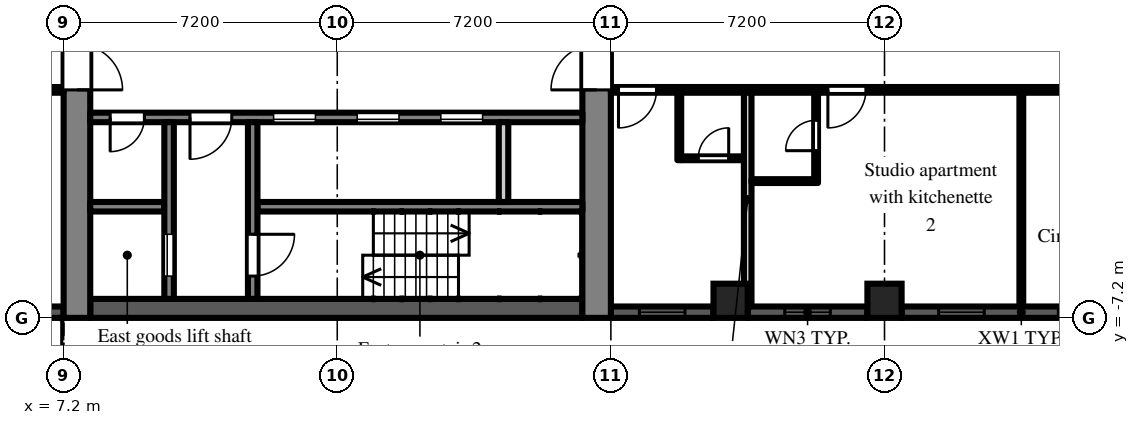
"""IFC4 building model, lengths in metres.
Left out: names, types, materials, properties, quantities, classifications, styles, units other than length and angle.
Written with IfcOpenShell. Run it as: python <this file> out.ifc"""

import sys

from ifc_helpers import new_model, si_unit, direction, frame, frame_2d, origin, origin_2d, place, context, subcontext, project, spatial, rectangle, extrude, element, fill, save


model = new_model("IFC4")
c1 = context("Model", 3, precision=1e-05, world=origin(), true_north=direction((0.0, 1.0)))
c2 = subcontext(c1, "Body", "Model", "MODEL_VIEW")
j1 = project(units=[si_unit("LENGTHUNIT", "METRE"), si_unit("PLANEANGLEUNIT", "RADIAN")], contexts=[c1])
p1 = place(None, origin())
s1 = spatial("IfcSite", under=j1, at=p1, CompositionType="ELEMENT")
p2 = place(p1, origin())
s2 = spatial("IfcBuilding", under=s1, at=p2, CompositionType="ELEMENT")
p3 = place(p2, frame((0.0, 0.0, 102.9)))
s3 = spatial("IfcBuildingStorey", under=s2, at=p3, CompositionType="ELEMENT", Elevation=102.9)
for number, where, z_axis, x_axis in (
    (1, (24.75, -6.75, 0.0), (0.0, 0.0, 1.0), (1.0, 0.0, 0.0)),
    (2, (28.8, -6.75, 0.0), (0.0, 0.0, 1.0), (1.0, 0.0, 0.0)),
):
    element("IfcColumn", number, at=place(p3, frame(where, z_axis=z_axis, x_axis=x_axis)), inside=s3, PredefinedType="COLUMN", context=c2, shape_type="SweptSolid", body=[
        extrude(rectangle(XDim=0.9, YDim=0.9, at=origin_2d()), origin(), (0.0, 0.0, 1.0), 3.0),
    ])
p4 = place(p3, frame((21.6, -7.05, 0.0), z_axis=(0.0, 0.0, 1.0), x_axis=(1.0, 0.0, 0.0)))
e3 = element("IfcWall", 3, at=p4, inside=s3, PredefinedType="SOLIDWALL", context=c2, shape_type="SweptSolid", body=[
    extrude(rectangle(XDim=2.7, YDim=0.3, at=frame_2d((1.35, 0.0))), origin(), (0.0, 0.0, 1.0), 2.1),
])
p5 = place(p4, frame((0.75, 0.0, 0.2)))
e4 = element("IfcOpeningElement", 4, at=p5, cuts=e3, PredefinedType="OPENING", context=c2, shape_type="SweptSolid", body=[
    extrude(rectangle(XDim=1.2, YDim=1.85, at=frame_2d((0.6, 0.925))), frame((0.0, 0.16, 0.0), z_axis=(0.0, -1.0, 0.0), x_axis=(1.0, 0.0, 0.0)), (0.0, 0.0, 1.0), 0.32),
])
p6 = place(p3, frame((25.2, -7.05, 0.0), z_axis=(0.0, 0.0, 1.0), x_axis=(1.0, 0.0, 0.0)))
e5 = element("IfcWall", 5, at=p6, inside=s3, PredefinedType="SOLIDWALL", context=c2, shape_type="SweptSolid", body=[
    extrude(rectangle(XDim=3.15, YDim=0.3, at=frame_2d((1.575, 0.0))), origin(), (0.0, 0.0, 1.0), 2.1),
])
p7 = place(p6, frame((0.975, 0.0, 0.2)))
e6 = element("IfcOpeningElement", 6, at=p7, cuts=e5, PredefinedType="OPENING", context=c2, shape_type="SweptSolid", body=[
    extrude(rectangle(XDim=1.2, YDim=1.85, at=frame_2d((0.6, 0.925))), frame((0.0, 0.16, 0.0), z_axis=(0.0, -1.0, 0.0), x_axis=(1.0, 0.0, 0.0)), (0.0, 0.0, 1.0), 0.32),
])
p8 = place(p3, frame((29.25, -7.05, 0.0), z_axis=(0.0, 0.0, 1.0), x_axis=(1.0, 0.0, 0.0)))
e7 = element("IfcWall", 7, at=p8, inside=s3, PredefinedType="SOLIDWALL", context=c2, shape_type="SweptSolid", body=[
    extrude(rectangle(XDim=6.3, YDim=0.3, at=frame_2d((3.15, 0.0))), origin(), (0.0, 0.0, 1.0), 2.1),
])
p9 = place(p8, frame((0.975, 0.0, 0.2)))
e8 = element("IfcOpeningElement", 8, at=p9, cuts=e7, PredefinedType="OPENING", context=c2, shape_type="SweptSolid", body=[
    extrude(rectangle(XDim=1.2, YDim=1.85, at=frame_2d((0.6, 0.925))), frame((0.0, 0.16, 0.0), z_axis=(0.0, -1.0, 0.0), x_axis=(1.0, 0.0, 0.0)), (0.0, 0.0, 1.0), 0.32),
])
p10 = place(p8, frame((4.125, 0.0, 0.2)))
e9 = element("IfcOpeningElement", 9, at=p10, cuts=e7, PredefinedType="OPENING", context=c2, shape_type="SweptSolid", body=[
    extrude(rectangle(XDim=1.2, YDim=1.85, at=frame_2d((0.6, 0.925))), frame((0.0, 0.16, 0.0), z_axis=(0.0, -1.0, 0.0), x_axis=(1.0, 0.0, 0.0)), (0.0, 0.0, 1.0), 0.32),
])
p11 = place(p3, frame((4.2, -7.05, 0.0), z_axis=(0.0, 0.0, 1.0), x_axis=(1.0, 0.0, 0.0)))
e10 = element("IfcWall", 10, at=p11, inside=s3, PredefinedType="SOLIDWALL", context=c2, shape_type="SweptSolid", body=[
    extrude(rectangle(XDim=3.0, YDim=0.3, at=frame_2d((1.5, 0.0))), origin(), (0.0, 0.0, 1.0), 2.1),
])
p12 = place(p3, frame((7.55, -7.2, 0.0), z_axis=(0.0, 0.0, 1.0), x_axis=(0.0, 1.0, 0.0)))
e11 = element("IfcWall", 11, at=p12, inside=s3, PredefinedType="SHEAR", context=c2, shape_type="SweptSolid", body=[
    extrude(rectangle(XDim=14.4, YDim=0.7, at=frame_2d((7.2, 0.0))), origin(), (0.0, 0.0, 1.0), 2.575),
])
p13 = place(p12, frame((6.0, 0.0, 0.0)))
e12 = element("IfcOpeningElement", 12, at=p13, cuts=e11, PredefinedType="OPENING", context=c2, shape_type="SweptSolid", body=[
    extrude(rectangle(XDim=2.4, YDim=2.2, at=frame_2d((1.2, 1.1))), frame((0.0, 0.36, 0.0), z_axis=(0.0, -1.0, 0.0), x_axis=(1.0, 0.0, 0.0)), (0.0, 0.0, 1.0), 0.72),
])
p14 = place(p3, frame((21.225, -7.2, 0.0), z_axis=(0.0, 0.0, 1.0), x_axis=(0.0, 1.0, 0.0)))
e13 = element("IfcWall", 13, at=p14, inside=s3, PredefinedType="SHEAR", context=c2, shape_type="SweptSolid", body=[
    extrude(rectangle(XDim=14.4, YDim=0.75, at=frame_2d((7.2, 0.0))), origin(), (0.0, 0.0, 1.0), 2.575),
])
p15 = place(p14, frame((6.0, 0.0, 0.0)))
e14 = element("IfcOpeningElement", 14, at=p15, cuts=e13, PredefinedType="OPENING", context=c2, shape_type="SweptSolid", body=[
    extrude(rectangle(XDim=2.4, YDim=2.2, at=frame_2d((1.2, 1.1))), frame((0.0, 0.385, 0.0), z_axis=(0.0, -1.0, 0.0), x_axis=(1.0, 0.0, 0.0)), (0.0, 0.0, 1.0), 0.77),
])
p16 = place(p3, frame((7.9, -6.95, 0.0), z_axis=(0.0, 0.0, 1.0), x_axis=(1.0, 0.0, 0.0)))
e15 = element("IfcWall", 15, at=p16, inside=s3, PredefinedType="SHEAR", context=c2, shape_type="SweptSolid", body=[
    extrude(rectangle(XDim=12.95, YDim=0.5, at=frame_2d((6.475, 0.0))), origin(), (0.0, 0.0, 1.0), 2.575),
])
p17 = place(p3, frame((7.9, -1.925, 0.0), z_axis=(0.0, 0.0, 1.0), x_axis=(1.0, 0.0, 0.0)))
e16 = element("IfcWall", 16, at=p17, inside=s3, PredefinedType="SHEAR", context=c2, shape_type="SweptSolid", body=[
    extrude(rectangle(XDim=12.95, YDim=0.25, at=frame_2d((6.475, 0.0))), origin(), (0.0, 0.0, 1.0), 2.575),
])
p18 = place(p17, frame((4.825, 0.0, 0.0)))
e17 = element("IfcOpeningElement", 17, at=p18, cuts=e16, PredefinedType="OPENING", context=c2, shape_type="SweptSolid", body=[
    extrude(rectangle(XDim=1.1, YDim=2.1, at=frame_2d((0.55, 1.05))), frame((0.0, 0.135, 0.0), z_axis=(0.0, -1.0, 0.0), x_axis=(1.0, 0.0, 0.0)), (0.0, 0.0, 1.0), 0.27),
])
p19 = place(p17, frame((7.025, 0.0, 0.0)))
e18 = element("IfcOpeningElement", 18, at=p19, cuts=e16, PredefinedType="OPENING", context=c2, shape_type="SweptSolid", body=[
    extrude(rectangle(XDim=1.1, YDim=2.1, at=frame_2d((0.55, 1.05))), frame((0.0, 0.135, 0.0), z_axis=(0.0, -1.0, 0.0), x_axis=(1.0, 0.0, 0.0)), (0.0, 0.0, 1.0), 0.27),
])
p20 = place(p17, frame((9.225, 0.0, 0.0)))
e19 = element("IfcOpeningElement", 19, at=p20, cuts=e16, PredefinedType="OPENING", context=c2, shape_type="SweptSolid", body=[
    extrude(rectangle(XDim=1.1, YDim=2.1, at=frame_2d((0.55, 1.05))), frame((0.0, 0.135, 0.0), z_axis=(0.0, -1.0, 0.0), x_axis=(1.0, 0.0, 0.0)), (0.0, 0.0, 1.0), 0.27),
])
p21 = place(p17, frame((0.525, 0.0, 0.0)))
e20 = element("IfcOpeningElement", 20, at=p21, cuts=e16, PredefinedType="OPENING", context=c2, shape_type="SweptSolid", body=[
    extrude(rectangle(XDim=0.9, YDim=2.1, at=frame_2d((0.45, 1.05))), frame((0.0, 0.135, 0.0), z_axis=(0.0, -1.0, 0.0), x_axis=(1.0, 0.0, 0.0)), (0.0, 0.0, 1.0), 0.27),
])
p22 = place(p17, frame((2.625, 0.0, 0.0)))
e21 = element("IfcOpeningElement", 21, at=p22, cuts=e16, PredefinedType="OPENING", context=c2, shape_type="SweptSolid", body=[
    extrude(rectangle(XDim=1.1, YDim=2.1, at=frame_2d((0.55, 1.05))), frame((0.0, 0.135, 0.0), z_axis=(0.0, -1.0, 0.0), x_axis=(1.0, 0.0, 0.0)), (0.0, 0.0, 1.0), 0.27),
])
p23 = place(p3, frame((7.9, -4.275, 0.0), z_axis=(0.0, 0.0, 1.0), x_axis=(1.0, 0.0, 0.0)))
e22 = element("IfcWall", 22, at=p23, inside=s3, PredefinedType="SHEAR", context=c2, shape_type="SweptSolid", body=[
    extrude(rectangle(XDim=1.95, YDim=0.25, at=frame_2d((0.975, 0.0))), origin(), (0.0, 0.0, 1.0), 2.575),
])
p24 = place(p3, frame((12.3, -4.275, 0.0), z_axis=(0.0, 0.0, 1.0), x_axis=(1.0, 0.0, 0.0)))
e23 = element("IfcWall", 23, at=p24, inside=s3, PredefinedType="SHEAR", context=c2, shape_type="SweptSolid", body=[
    extrude(rectangle(XDim=8.55, YDim=0.25, at=frame_2d((4.275, 0.0))), origin(), (0.0, 0.0, 1.0), 2.575),
])
p25 = place(p3, frame((9.975, -2.05, 0.0), z_axis=(0.0, 0.0, 1.0), x_axis=(0.0, -1.0, 0.0)))
e24 = element("IfcWall", 24, at=p25, inside=s3, PredefinedType="SHEAR", context=c2, shape_type="SweptSolid", body=[
    extrude(rectangle(XDim=4.65, YDim=0.25, at=frame_2d((2.325, 0.0))), origin(), (0.0, 0.0, 1.0), 2.575),
])
p26 = place(p25, frame((2.95, 0.0, 0.0)))
e25 = element("IfcOpeningElement", 25, at=p26, cuts=e24, PredefinedType="OPENING", context=c2, shape_type="SweptSolid", body=[
    extrude(rectangle(XDim=1.1, YDim=2.1, at=frame_2d((0.55, 1.05))), frame((0.0, 0.135, 0.0), z_axis=(0.0, -1.0, 0.0), x_axis=(1.0, 0.0, 0.0)), (0.0, 0.0, 1.0), 0.27),
])
p27 = place(p3, frame((12.175, -2.05, 0.0), z_axis=(0.0, 0.0, 1.0), x_axis=(0.0, -1.0, 0.0)))
e26 = element("IfcWall", 26, at=p27, inside=s3, PredefinedType="SHEAR", context=c2, shape_type="SweptSolid", body=[
    extrude(rectangle(XDim=4.65, YDim=0.25, at=frame_2d((2.325, 0.0))), origin(), (0.0, 0.0, 1.0), 2.575),
])
p28 = place(p27, frame((2.95, 0.0, 0.0)))
e27 = element("IfcOpeningElement", 27, at=p28, cuts=e26, PredefinedType="OPENING", context=c2, shape_type="SweptSolid", body=[
    extrude(rectangle(XDim=1.1, YDim=2.1, at=frame_2d((0.55, 1.05))), frame((0.0, 0.135, 0.0), z_axis=(0.0, -1.0, 0.0), x_axis=(1.0, 0.0, 0.0)), (0.0, 0.0, 1.0), 0.27),
])
p29 = place(p3, frame((18.775, -2.05, 0.0), z_axis=(0.0, 0.0, 1.0), x_axis=(0.0, -1.0, 0.0)))
e28 = element("IfcWall", 28, at=p29, inside=s3, PredefinedType="PARTITIONING", context=c2, shape_type="SweptSolid", body=[
    extrude(rectangle(XDim=2.1, YDim=0.25, at=frame_2d((1.05, 0.0))), origin(), (0.0, 0.0, 1.0), 2.575),
])
p30 = place(p3, frame((1.275, -1.2, 0.0), z_axis=(0.0, 0.0, 1.0), x_axis=(1.0, 0.0, 0.0)))
e29 = element("IfcWall", 29, at=p30, inside=s3, PredefinedType="PARTITIONING", context=c2, shape_type="SweptSolid", body=[
    extrude(rectangle(XDim=5.925, YDim=0.15, at=frame_2d((2.962, 0.0))), origin(), (0.0, 0.0, 1.0), 2.575),
])
p31 = place(p30, frame((3.075, 0.0, 0.0)))
e30 = element("IfcOpeningElement", 30, at=p31, cuts=e29, PredefinedType="OPENING", context=c2, shape_type="SweptSolid", body=[
    extrude(rectangle(XDim=0.9, YDim=2.1, at=frame_2d((0.45, 1.05))), frame((0.0, 0.085, 0.0), z_axis=(0.0, -1.0, 0.0), x_axis=(1.0, 0.0, 0.0)), (0.0, 0.0, 1.0), 0.17),
])
p32 = place(p3, frame((21.6, -1.2, 0.0), z_axis=(0.0, 0.0, 1.0), x_axis=(1.0, 0.0, 0.0)))
e31 = element("IfcWall", 31, at=p32, inside=s3, PredefinedType="PARTITIONING", context=c2, shape_type="SweptSolid", body=[
    extrude(rectangle(XDim=14.9, YDim=0.15, at=frame_2d((7.45, 0.0))), origin(), (0.0, 0.0, 1.0), 2.575),
])
p33 = place(p32, frame((0.2, 0.0, 0.0)))
e32 = element("IfcOpeningElement", 32, at=p33, cuts=e31, PredefinedType="OPENING", context=c2, shape_type="SweptSolid", body=[
    extrude(rectangle(XDim=1.0, YDim=2.1, at=frame_2d((0.5, 1.05))), frame((0.0, 0.085, 0.0), z_axis=(0.0, -1.0, 0.0), x_axis=(1.0, 0.0, 0.0)), (0.0, 0.0, 1.0), 0.17),
])
p34 = place(p32, frame((5.71, 0.0, 0.0)))
e33 = element("IfcOpeningElement", 33, at=p34, cuts=e31, PredefinedType="OPENING", context=c2, shape_type="SweptSolid", body=[
    extrude(rectangle(XDim=1.0, YDim=2.1, at=frame_2d((0.5, 1.05))), frame((0.0, 0.085, 0.0), z_axis=(0.0, -1.0, 0.0), x_axis=(1.0, 0.0, 0.0)), (0.0, 0.0, 1.0), 0.17),
])
p35 = place(p32, frame((11.95, 0.0, 0.0)))
e34 = element("IfcOpeningElement", 34, at=p35, cuts=e31, PredefinedType="OPENING", context=c2, shape_type="SweptSolid", body=[
    extrude(rectangle(XDim=1.8, YDim=2.1, at=frame_2d((0.9, 1.05))), frame((0.0, 0.085, 0.0), z_axis=(0.0, -1.0, 0.0), x_axis=(1.0, 0.0, 0.0)), (0.0, 0.0, 1.0), 0.17),
])
p36 = place(p3, frame((23.4, -3.05, 0.0), z_axis=(0.0, 0.0, 1.0), x_axis=(0.0, 1.0, 0.0)))
e35 = element("IfcWall", 35, at=p36, inside=s3, PredefinedType="PARTITIONING", context=c2, shape_type="SweptSolid", body=[
    extrude(rectangle(XDim=1.775, YDim=0.1, at=frame_2d((0.888, 0.0))), origin(), (0.0, 0.0, 1.0), 2.575),
])
p37 = place(p3, frame((23.45, -3.0, 0.0), z_axis=(0.0, 0.0, 1.0), x_axis=(1.0, 0.0, 0.0)))
e36 = element("IfcWall", 36, at=p37, inside=s3, PredefinedType="PARTITIONING", context=c2, shape_type="SweptSolid", body=[
    extrude(rectangle(XDim=1.65, YDim=0.1, at=frame_2d((0.825, 0.0))), origin(), (0.0, 0.0, 1.0), 2.575),
])
p38 = place(p37, frame((0.45, 0.0, 0.0)))
e37 = element("IfcOpeningElement", 37, at=p38, cuts=e36, PredefinedType="OPENING", context=c2, shape_type="SweptSolid", body=[
    extrude(rectangle(XDim=0.8, YDim=2.1, at=frame_2d((0.4, 1.05))), frame((0.0, 0.06, 0.0), z_axis=(0.0, -1.0, 0.0), x_axis=(1.0, 0.0, 0.0)), (0.0, 0.0, 1.0), 0.12),
])
p39 = place(p3, frame((25.2, -6.9, 0.0), z_axis=(0.0, 0.0, 1.0), x_axis=(0.0, 1.0, 0.0)))
e38 = element("IfcWall", 38, at=p39, inside=s3, PredefinedType="PARTITIONING", context=c2, shape_type="SweptSolid", body=[
    extrude(rectangle(XDim=5.625, YDim=0.2, at=frame_2d((2.812, 0.0))), origin(), (0.0, 0.0, 1.0), 2.575),
])
p40 = place(p3, frame((25.3, -3.6, 0.0), z_axis=(0.0, 0.0, 1.0), x_axis=(1.0, 0.0, 0.0)))
e39 = element("IfcWall", 39, at=p40, inside=s3, PredefinedType="PARTITIONING", context=c2, shape_type="SweptSolid", body=[
    extrude(rectangle(XDim=1.75, YDim=0.1, at=frame_2d((0.875, 0.0))), origin(), (0.0, 0.0, 1.0), 2.575),
])
p41 = place(p3, frame((27.0, -3.55, 0.0), z_axis=(0.0, 0.0, 1.0), x_axis=(0.0, 1.0, 0.0)))
e40 = element("IfcWall", 40, at=p41, inside=s3, PredefinedType="PARTITIONING", context=c2, shape_type="SweptSolid", body=[
    extrude(rectangle(XDim=2.275, YDim=0.1, at=frame_2d((1.138, 0.0))), origin(), (0.0, 0.0, 1.0), 2.575),
])
p42 = place(p41, frame((0.75, 0.0, 0.0)))
e41 = element("IfcOpeningElement", 41, at=p42, cuts=e40, PredefinedType="OPENING", context=c2, shape_type="SweptSolid", body=[
    extrude(rectangle(XDim=0.8, YDim=2.1, at=frame_2d((0.4, 1.05))), frame((0.0, 0.06, 0.0), z_axis=(0.0, -1.0, 0.0), x_axis=(1.0, 0.0, 0.0)), (0.0, 0.0, 1.0), 0.12),
])
p43 = place(p3, frame((32.4, -6.9, 0.0), z_axis=(0.0, 0.0, 1.0), x_axis=(0.0, 1.0, 0.0)))
e42 = element("IfcWall", 42, at=p43, inside=s3, PredefinedType="PARTITIONING", context=c2, shape_type="SweptSolid", body=[
    extrude(rectangle(XDim=5.625, YDim=0.1, at=frame_2d((2.812, 0.0))), origin(), (0.0, 0.0, 1.0), 2.575),
])
p44 = place(p5, origin())
e43 = element("IfcWindow", 43, at=p44, inside=s3, PartitioningType="SINGLE_PANEL", PredefinedType="WINDOW", context=c2, shape_type="SweptSolid", body=[
    extrude(rectangle(XDim=1.2, YDim=1.85, at=frame_2d((0.6, 0.925))), frame((0.0, 0.03, 0.0), z_axis=(0.0, -1.0, 0.0), x_axis=(1.0, 0.0, 0.0)), (0.0, 0.0, 1.0), 0.06),
])
fill(e4, e43)
p45 = place(p7, origin())
e44 = element("IfcWindow", 44, at=p45, inside=s3, PartitioningType="SINGLE_PANEL", PredefinedType="WINDOW", context=c2, shape_type="SweptSolid", body=[
    extrude(rectangle(XDim=1.2, YDim=1.85, at=frame_2d((0.6, 0.925))), frame((0.0, 0.03, 0.0), z_axis=(0.0, -1.0, 0.0), x_axis=(1.0, 0.0, 0.0)), (0.0, 0.0, 1.0), 0.06),
])
fill(e6, e44)
p46 = place(p9, origin())
e45 = element("IfcWindow", 45, at=p46, inside=s3, PartitioningType="SINGLE_PANEL", PredefinedType="WINDOW", context=c2, shape_type="SweptSolid", body=[
    extrude(rectangle(XDim=1.2, YDim=1.85, at=frame_2d((0.6, 0.925))), frame((0.0, 0.03, 0.0), z_axis=(0.0, -1.0, 0.0), x_axis=(1.0, 0.0, 0.0)), (0.0, 0.0, 1.0), 0.06),
])
fill(e8, e45)
p47 = place(p10, origin())
e46 = element("IfcWindow", 46, at=p47, inside=s3, PartitioningType="SINGLE_PANEL", PredefinedType="WINDOW", context=c2, shape_type="SweptSolid", body=[
    extrude(rectangle(XDim=1.2, YDim=1.85, at=frame_2d((0.6, 0.925))), frame((0.0, 0.03, 0.0), z_axis=(0.0, -1.0, 0.0), x_axis=(1.0, 0.0, 0.0)), (0.0, 0.0, 1.0), 0.06),
])
fill(e9, e46)
p48 = place(p18, origin())
e47 = element("IfcDoor", 47, at=p48, inside=s3, OperationType="SLIDING_TO_LEFT", PredefinedType="DOOR", context=c2, shape_type="SweptSolid", body=[
    extrude(rectangle(XDim=1.1, YDim=2.1, at=frame_2d((0.55, 1.05))), frame((0.0, 0.025, 0.0), z_axis=(0.0, -1.0, 0.0), x_axis=(1.0, 0.0, 0.0)), (0.0, 0.0, 1.0), 0.05),
])
fill(e17, e47)
p49 = place(p19, origin())
e48 = element("IfcDoor", 48, at=p49, inside=s3, OperationType="SLIDING_TO_LEFT", PredefinedType="DOOR", context=c2, shape_type="SweptSolid", body=[
    extrude(rectangle(XDim=1.1, YDim=2.1, at=frame_2d((0.55, 1.05))), frame((0.0, 0.025, 0.0), z_axis=(0.0, -1.0, 0.0), x_axis=(1.0, 0.0, 0.0)), (0.0, 0.0, 1.0), 0.05),
])
fill(e18, e48)
p50 = place(p20, origin())
e49 = element("IfcDoor", 49, at=p50, inside=s3, OperationType="SLIDING_TO_LEFT", PredefinedType="DOOR", context=c2, shape_type="SweptSolid", body=[
    extrude(rectangle(XDim=1.1, YDim=2.1, at=frame_2d((0.55, 1.05))), frame((0.0, 0.025, 0.0), z_axis=(0.0, -1.0, 0.0), x_axis=(1.0, 0.0, 0.0)), (0.0, 0.0, 1.0), 0.05),
])
fill(e19, e49)
p51 = place(p26, origin())
e50 = element("IfcDoor", 50, at=p51, inside=s3, OperationType="SLIDING_TO_LEFT", PredefinedType="DOOR", context=c2, shape_type="SweptSolid", body=[
    extrude(rectangle(XDim=1.1, YDim=2.1, at=frame_2d((0.55, 1.05))), frame((0.0, 0.025, 0.0), z_axis=(0.0, -1.0, 0.0), x_axis=(1.0, 0.0, 0.0)), (0.0, 0.0, 1.0), 0.05),
])
fill(e25, e50)
p52 = place(p28, origin())
e51 = element("IfcDoor", 51, at=p52, inside=s3, OperationType="SINGLE_SWING_LEFT", PredefinedType="DOOR", context=c2, shape_type="SweptSolid", body=[
    extrude(rectangle(XDim=1.1, YDim=2.1, at=frame_2d((0.55, 1.05))), frame((0.0, 0.025, 0.0), z_axis=(0.0, -1.0, 0.0), x_axis=(1.0, 0.0, 0.0)), (0.0, 0.0, 1.0), 0.05),
])
fill(e27, e51)
p53 = place(p21, frame((0.9, 0.0, 0.0), z_axis=(0.0, 0.0, 1.0), x_axis=(-1.0, 0.0, 0.0)))
e52 = element("IfcDoor", 52, at=p53, inside=s3, OperationType="SINGLE_SWING_RIGHT", PredefinedType="DOOR", context=c2, shape_type="SweptSolid", body=[
    extrude(rectangle(XDim=0.9, YDim=2.1, at=frame_2d((0.45, 1.05))), frame((0.0, 0.025, 0.0), z_axis=(0.0, -1.0, 0.0), x_axis=(1.0, 0.0, 0.0)), (0.0, 0.0, 1.0), 0.05),
])
fill(e20, e52)
p54 = place(p22, frame((1.1, 0.0, 0.0), z_axis=(0.0, 0.0, 1.0), x_axis=(-1.0, 0.0, 0.0)))
e53 = element("IfcDoor", 53, at=p54, inside=s3, OperationType="SINGLE_SWING_RIGHT", PredefinedType="DOOR", context=c2, shape_type="SweptSolid", body=[
    extrude(rectangle(XDim=1.1, YDim=2.1, at=frame_2d((0.55, 1.05))), frame((0.0, 0.025, 0.0), z_axis=(0.0, -1.0, 0.0), x_axis=(1.0, 0.0, 0.0)), (0.0, 0.0, 1.0), 0.05),
])
fill(e21, e53)
p55 = place(p13, frame((2.4, 0.0, 0.0), z_axis=(0.0, 0.0, 1.0), x_axis=(-1.0, 0.0, 0.0)))
e54 = element("IfcDoor", 54, at=p55, inside=s3, OperationType="DOUBLE_DOOR_DOUBLE_SWING", PredefinedType="DOOR", context=c2, shape_type="SweptSolid", body=[
    extrude(rectangle(XDim=2.4, YDim=2.2, at=frame_2d((1.2, 1.1))), frame((0.0, 0.025, 0.0), z_axis=(0.0, -1.0, 0.0), x_axis=(1.0, 0.0, 0.0)), (0.0, 0.0, 1.0), 0.05),
])
fill(e12, e54)
p56 = place(p15, origin())
e55 = element("IfcDoor", 55, at=p56, inside=s3, OperationType="DOUBLE_DOOR_DOUBLE_SWING", PredefinedType="DOOR", context=c2, shape_type="SweptSolid", body=[
    extrude(rectangle(XDim=2.4, YDim=2.2, at=frame_2d((1.2, 1.1))), frame((0.0, 0.025, 0.0), z_axis=(0.0, -1.0, 0.0), x_axis=(1.0, 0.0, 0.0)), (0.0, 0.0, 1.0), 0.05),
])
fill(e14, e55)
p57 = place(p38, origin())
e56 = element("IfcDoor", 56, at=p57, inside=s3, OperationType="SINGLE_SWING_RIGHT", PredefinedType="DOOR", context=c2, shape_type="SweptSolid", body=[
    extrude(rectangle(XDim=0.8, YDim=2.1, at=frame_2d((0.4, 1.05))), frame((0.0, 0.025, 0.0), z_axis=(0.0, -1.0, 0.0), x_axis=(1.0, 0.0, 0.0)), (0.0, 0.0, 1.0), 0.05),
])
fill(e37, e56)
p58 = place(p33, frame((1.0, 0.0, 0.0), z_axis=(0.0, 0.0, 1.0), x_axis=(-1.0, 0.0, 0.0)))
e57 = element("IfcDoor", 57, at=p58, inside=s3, OperationType="SINGLE_SWING_RIGHT", PredefinedType="DOOR", context=c2, shape_type="SweptSolid", body=[
    extrude(rectangle(XDim=1.0, YDim=2.1, at=frame_2d((0.5, 1.05))), frame((0.0, 0.025, 0.0), z_axis=(0.0, -1.0, 0.0), x_axis=(1.0, 0.0, 0.0)), (0.0, 0.0, 1.0), 0.05),
])
fill(e32, e57)
p59 = place(p42, origin())
e58 = element("IfcDoor", 58, at=p59, inside=s3, OperationType="SINGLE_SWING_LEFT", PredefinedType="DOOR", context=c2, shape_type="SweptSolid", body=[
    extrude(rectangle(XDim=0.8, YDim=2.1, at=frame_2d((0.4, 1.05))), frame((0.0, 0.025, 0.0), z_axis=(0.0, -1.0, 0.0), x_axis=(1.0, 0.0, 0.0)), (0.0, 0.0, 1.0), 0.05),
])
fill(e41, e58)
p60 = place(p34, frame((1.0, 0.0, 0.0), z_axis=(0.0, 0.0, 1.0), x_axis=(-1.0, 0.0, 0.0)))
e59 = element("IfcDoor", 59, at=p60, inside=s3, OperationType="SINGLE_SWING_RIGHT", PredefinedType="DOOR", context=c2, shape_type="SweptSolid", body=[
    extrude(rectangle(XDim=1.0, YDim=2.1, at=frame_2d((0.5, 1.05))), frame((0.0, 0.025, 0.0), z_axis=(0.0, -1.0, 0.0), x_axis=(1.0, 0.0, 0.0)), (0.0, 0.0, 1.0), 0.05),
])
fill(e33, e59)
save(model, sys.argv[1])
